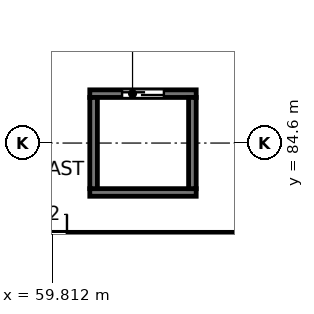
"""IFC4 building model, lengths in metres.
Left out: names, types, materials, properties, quantities, classifications, styles, units other than length and angle.
Written with IfcOpenShell. Run it as: python <this file> out.ifc"""

import sys

from ifc_helpers import new_model, si_unit, direction, frame, frame_2d, origin, place, context, subcontext, project, spatial, rectangle, extrude, element, fill, save


model = new_model("IFC4")
c1 = context("Model", 3, precision=1e-05, world=origin(), true_north=direction((0.0, 1.0)))
c2 = subcontext(c1, "Body", "Model", "MODEL_VIEW")
j1 = project(units=[si_unit("LENGTHUNIT", "METRE"), si_unit("PLANEANGLEUNIT", "RADIAN")], contexts=[c1])
p1 = place(None, origin())
s1 = spatial("IfcSite", under=j1, at=p1, CompositionType="ELEMENT")
p2 = place(p1, origin())
s2 = spatial("IfcBuilding", under=s1, at=p2, CompositionType="ELEMENT")
p3 = place(p2, frame((0.0, 0.0, 4.8)))
s3 = spatial("IfcBuildingStorey", under=s2, at=p3, CompositionType="ELEMENT", Elevation=4.8)
p4 = place(p3, frame((58.3, 82.125, 0.0), z_axis=(0.0, 0.0, 1.0), x_axis=(1.0, 0.0, 0.0)))
e1 = element("IfcWall", 1, at=p4, inside=s3, PredefinedType="SOLIDWALL", context=c2, shape_type="SweptSolid", body=[
    extrude(rectangle(XDim=7.4, YDim=0.25, at=frame_2d((3.7, 0.0))), origin(), (0.0, 0.0, 1.0), 4.8),
])
p5 = place(p4, frame((0.7, 0.0, 0.0)))
e2 = element("IfcOpeningElement", 2, at=p5, cuts=e1, PredefinedType="OPENING", context=c2, shape_type="SweptSolid", body=[
    extrude(rectangle(XDim=1.2, YDim=2.1, at=frame_2d((0.6, 1.05))), frame((0.0, 0.135, 0.0), z_axis=(0.0, -1.0, 0.0), x_axis=(1.0, 0.0, 0.0)), (0.0, 0.0, 1.0), 0.27),
])
p6 = place(p3, frame((60.8, 83.3, 0.0), z_axis=(0.0, 0.0, 1.0), x_axis=(1.0, 0.0, 0.0)))
e3 = element("IfcWall", 3, at=p6, inside=s3, PredefinedType="SOLIDWALL", context=c2, shape_type="SweptSolid", body=[
    extrude(rectangle(XDim=2.8, YDim=0.2, at=frame_2d((1.4, 0.0))), origin(), (0.0, 0.0, 1.0), 4.8),
])
p7 = place(p3, frame((60.8, 85.9, 0.0), z_axis=(0.0, 0.0, 1.0), x_axis=(1.0, 0.0, 0.0)))
e4 = element("IfcWall", 4, at=p7, inside=s3, PredefinedType="SOLIDWALL", context=c2, shape_type="SweptSolid", body=[
    extrude(rectangle(XDim=2.8, YDim=0.2, at=frame_2d((1.4, 0.0))), origin(), (0.0, 0.0, 1.0), 4.8),
])
p8 = place(p7, frame((0.85, 0.0, 0.0)))
e5 = element("IfcOpeningElement", 5, at=p8, cuts=e4, PredefinedType="OPENING", context=c2, shape_type="SweptSolid", body=[
    extrude(rectangle(XDim=1.1, YDim=2.1, at=frame_2d((0.55, 1.05))), frame((0.0, 0.11, 0.0), z_axis=(0.0, -1.0, 0.0), x_axis=(1.0, 0.0, 0.0)), (0.0, 0.0, 1.0), 0.22),
])
for number, where, z_axis, x_axis in (
    (6, (60.9, 83.4, 0.0), (0.0, 0.0, 1.0), (0.0, 1.0, 0.0)),
    (7, (63.5, 83.4, 0.0), (0.0, 0.0, 1.0), (0.0, 1.0, 0.0)),
):
    element("IfcWall", number, at=place(p3, frame(where, z_axis=z_axis, x_axis=x_axis)), inside=s3, PredefinedType="SOLIDWALL", context=c2, shape_type="SweptSolid", body=[
        extrude(rectangle(XDim=2.4, YDim=0.2, at=frame_2d((1.2, 0.0))), origin(), (0.0, 0.0, 1.0), 4.8),
    ])
p9 = place(p8, origin())
e8 = element("IfcDoor", 8, at=p9, inside=s3, OperationType="SLIDING_TO_LEFT", PredefinedType="DOOR", context=c2, shape_type="SweptSolid", body=[
    extrude(rectangle(XDim=1.1, YDim=2.1, at=frame_2d((0.55, 1.05))), frame((0.0, 0.025, 0.0), z_axis=(0.0, -1.0, 0.0), x_axis=(1.0, 0.0, 0.0)), (0.0, 0.0, 1.0), 0.05),
])
fill(e5, e8)
save(model, sys.argv[1])
